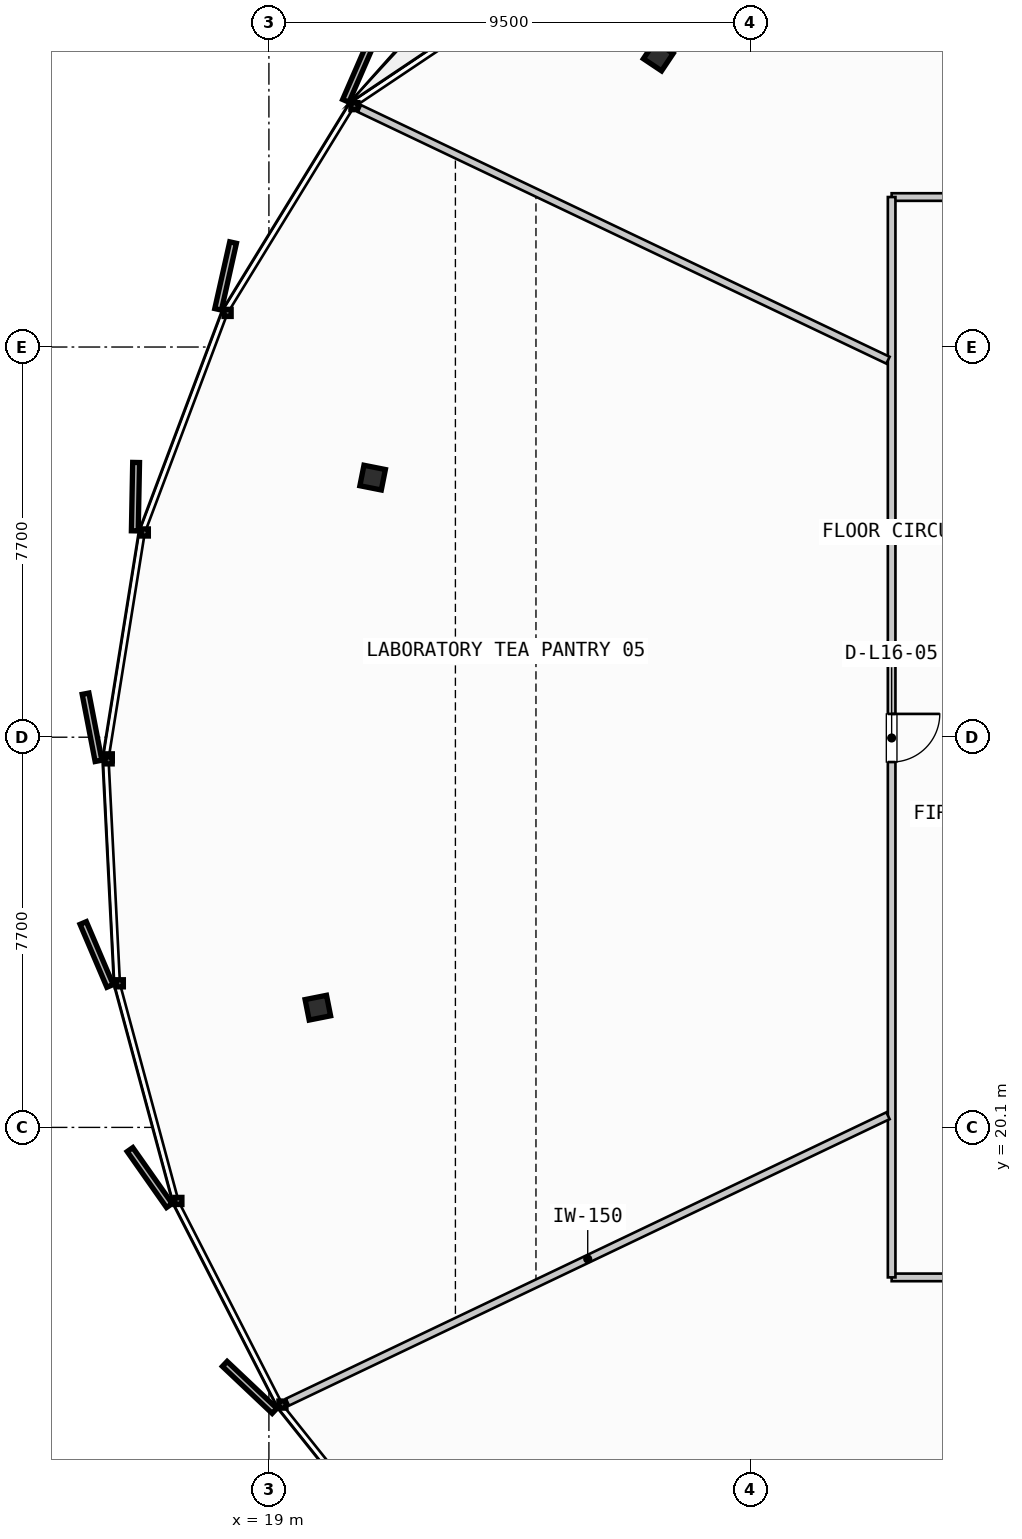
"""IFC4 building model, lengths in metres.
Left out: names, types, materials, properties, quantities, classifications, styles, units other than length and angle.
Written with IfcOpenShell. Run it as: python <this file> out.ifc"""

import sys

from ifc_helpers import new_model, si_unit, direction, frame, frame_2d, origin, origin_2d, place, context, subcontext, project, spatial, rectangle, i_section, extrude, source, transform, mapped, element, fill, save


model = new_model("IFC4")
c1 = context("Model", 3, precision=1e-05, world=origin(), true_north=direction((0.0, 1.0)))
c2 = subcontext(c1, "Body", "Model", "MODEL_VIEW")
j1 = project(units=[si_unit("LENGTHUNIT", "METRE"), si_unit("PLANEANGLEUNIT", "RADIAN")], contexts=[c1])
p1 = place(None, origin())
s1 = spatial("IfcSite", under=j1, at=p1, CompositionType="ELEMENT")
p2 = place(p1, origin())
s2 = spatial("IfcBuilding", under=s1, at=p2, CompositionType="ELEMENT")
p3 = place(p2, frame((0.0, 0.0, 67.6)))
s3 = spatial("IfcBuildingStorey", under=s2, at=p3, CompositionType="ELEMENT", Elevation=67.6)
m1 = source(origin(), c2, "Body", "SweptSolid", [
    extrude(i_section(OverallWidth=0.412, OverallDepth=0.431, WebThickness=0.042, FlangeThickness=0.068, FilletRadius=0.015, at=origin_2d()), origin(), (0.0, 0.0, 1.0), 3.55),
])
for number, where, z_axis, x_axis in (
    (1, (26.685, 41.241, 0.0), (0.0, 0.0, 1.0), (-0.831, 0.556, 0.0)),
    (2, (21.047, 32.923, 0.0), (0.0, 0.0, 1.0), (-0.981, 0.195, 0.0)),
    (3, (19.966, 22.462, 0.0), (0.0, 0.0, 1.0), (-0.981, -0.195, 0.0)),
):
    element("IfcColumn", number, at=place(p3, frame(where, z_axis=z_axis, x_axis=x_axis)), inside=s3, PredefinedType="COLUMN", context=c2, shape_type="MappedRepresentation", body=[
        mapped(m1, transform((0.0, 0.0, 0.0), scale=1.0)),
    ])
p4 = place(p3, frame((31.29, 17.14, 0.0), z_axis=(0.0, 0.0, 1.0), x_axis=(1.0, 0.0, 0.0)))
e4 = element("IfcWall", 4, at=p4, inside=s3, PredefinedType="PARTITIONING", context=c2, shape_type="SweptSolid", body=[
    extrude(rectangle(XDim=29.46, YDim=0.15, at=frame_2d((14.73, 0.0))), origin(), (0.0, 0.0, 1.0), 2.505),
])
p5 = place(p4, frame((12.998, 0.0, 0.0)))
e5 = element("IfcOpeningElement", 5, at=p5, cuts=e4, PredefinedType="OPENING", context=c2, shape_type="SweptSolid", body=[
    extrude(rectangle(XDim=0.95, YDim=2.15, at=frame_2d((0.475, 1.075))), frame((0.0, 0.085, 0.0), z_axis=(0.0, -1.0, 0.0), x_axis=(1.0, 0.0, 0.0)), (0.0, 0.0, 1.0), 0.17),
])
p6 = place(p3, frame((60.75, 38.46, 0.0), z_axis=(0.0, 0.0, 1.0), x_axis=(-1.0, 0.0, 0.0)))
e6 = element("IfcWall", 6, at=p6, inside=s3, PredefinedType="PARTITIONING", context=c2, shape_type="SweptSolid", body=[
    extrude(rectangle(XDim=29.46, YDim=0.15, at=frame_2d((14.73, 0.0))), origin(), (0.0, 0.0, 1.0), 2.505),
])
p7 = place(p6, frame((7.091, 0.0, 0.0)))
e7 = element("IfcOpeningElement", 7, at=p7, cuts=e6, PredefinedType="OPENING", context=c2, shape_type="SweptSolid", body=[
    extrude(rectangle(XDim=0.95, YDim=2.15, at=frame_2d((0.475, 1.075))), frame((0.0, 0.085, 0.0), z_axis=(0.0, -1.0, 0.0), x_axis=(1.0, 0.0, 0.0)), (0.0, 0.0, 1.0), 0.17),
])
p8 = place(p6, frame((20.628, 0.0, 0.0)))
e8 = element("IfcOpeningElement", 8, at=p8, cuts=e6, PredefinedType="OPENING", context=c2, shape_type="SweptSolid", body=[
    extrude(rectangle(XDim=0.95, YDim=2.15, at=frame_2d((0.475, 1.075))), frame((0.0, 0.085, 0.0), z_axis=(0.0, -1.0, 0.0), x_axis=(1.0, 0.0, 0.0)), (0.0, 0.0, 1.0), 0.17),
])
p9 = place(p3, frame((31.29, 38.46, 0.0), z_axis=(0.0, 0.0, 1.0), x_axis=(0.0, -1.0, 0.0)))
e9 = element("IfcWall", 9, at=p9, inside=s3, PredefinedType="PARTITIONING", context=c2, shape_type="SweptSolid", body=[
    extrude(rectangle(XDim=21.32, YDim=0.15, at=frame_2d((10.66, 0.0))), origin(), (0.0, 0.0, 1.0), 2.505),
])
p10 = place(p9, frame((10.2, 0.0, 0.0)))
e10 = element("IfcOpeningElement", 10, at=p10, cuts=e9, PredefinedType="OPENING", context=c2, shape_type="SweptSolid", body=[
    extrude(rectangle(XDim=0.95, YDim=2.15, at=frame_2d((0.475, 1.075))), frame((0.0, 0.085, 0.0), z_axis=(0.0, -1.0, 0.0), x_axis=(1.0, 0.0, 0.0)), (0.0, 0.0, 1.0), 0.17),
])
p11 = place(p3, frame((31.218, 20.33, 0.0), z_axis=(0.0, 0.0, 1.0), x_axis=(-0.902605348343, -0.430469029248, 0.0)))
e11 = element("IfcWall", 11, at=p11, inside=s3, PredefinedType="PARTITIONING", context=c2, shape_type="SweptSolid", body=[
    extrude(rectangle(XDim=13.131, YDim=0.15, at=frame_2d((6.565, 0.0))), origin(), (0.0, 0.0, 1.0), 2.505),
])
p12 = place(p3, frame((31.218, 35.24, 0.0), z_axis=(0.0, 0.0, 1.0), x_axis=(-0.90287106559, 0.429911431484, 0.0)))
e12 = element("IfcWall", 12, at=p12, inside=s3, PredefinedType="PARTITIONING", context=c2, shape_type="SweptSolid", body=[
    extrude(rectangle(XDim=11.552, YDim=0.15, at=frame_2d((5.776, 0.0))), origin(), (0.0, 0.0, 1.0), 2.505),
])
m2 = source(origin(), c2, "Body", "SweptSolid", [
    extrude(rectangle(XDim=0.95, YDim=2.15, at=frame_2d((0.475, 1.075))), frame((0.0, 0.025, 0.0), z_axis=(0.0, -1.0, 0.0), x_axis=(1.0, 0.0, 0.0)), (0.0, 0.0, 1.0), 0.05),
])
p13 = place(p10, origin())
e13 = element("IfcDoor", 13, at=p13, inside=s3, OperationType="SINGLE_SWING_LEFT", PredefinedType="DOOR", context=c2, shape_type="MappedRepresentation", body=[
    mapped(m2, transform((0.0, 0.0, 0.0), scale=1.0)),
])
fill(e10, e13)
save(model, sys.argv[1])
